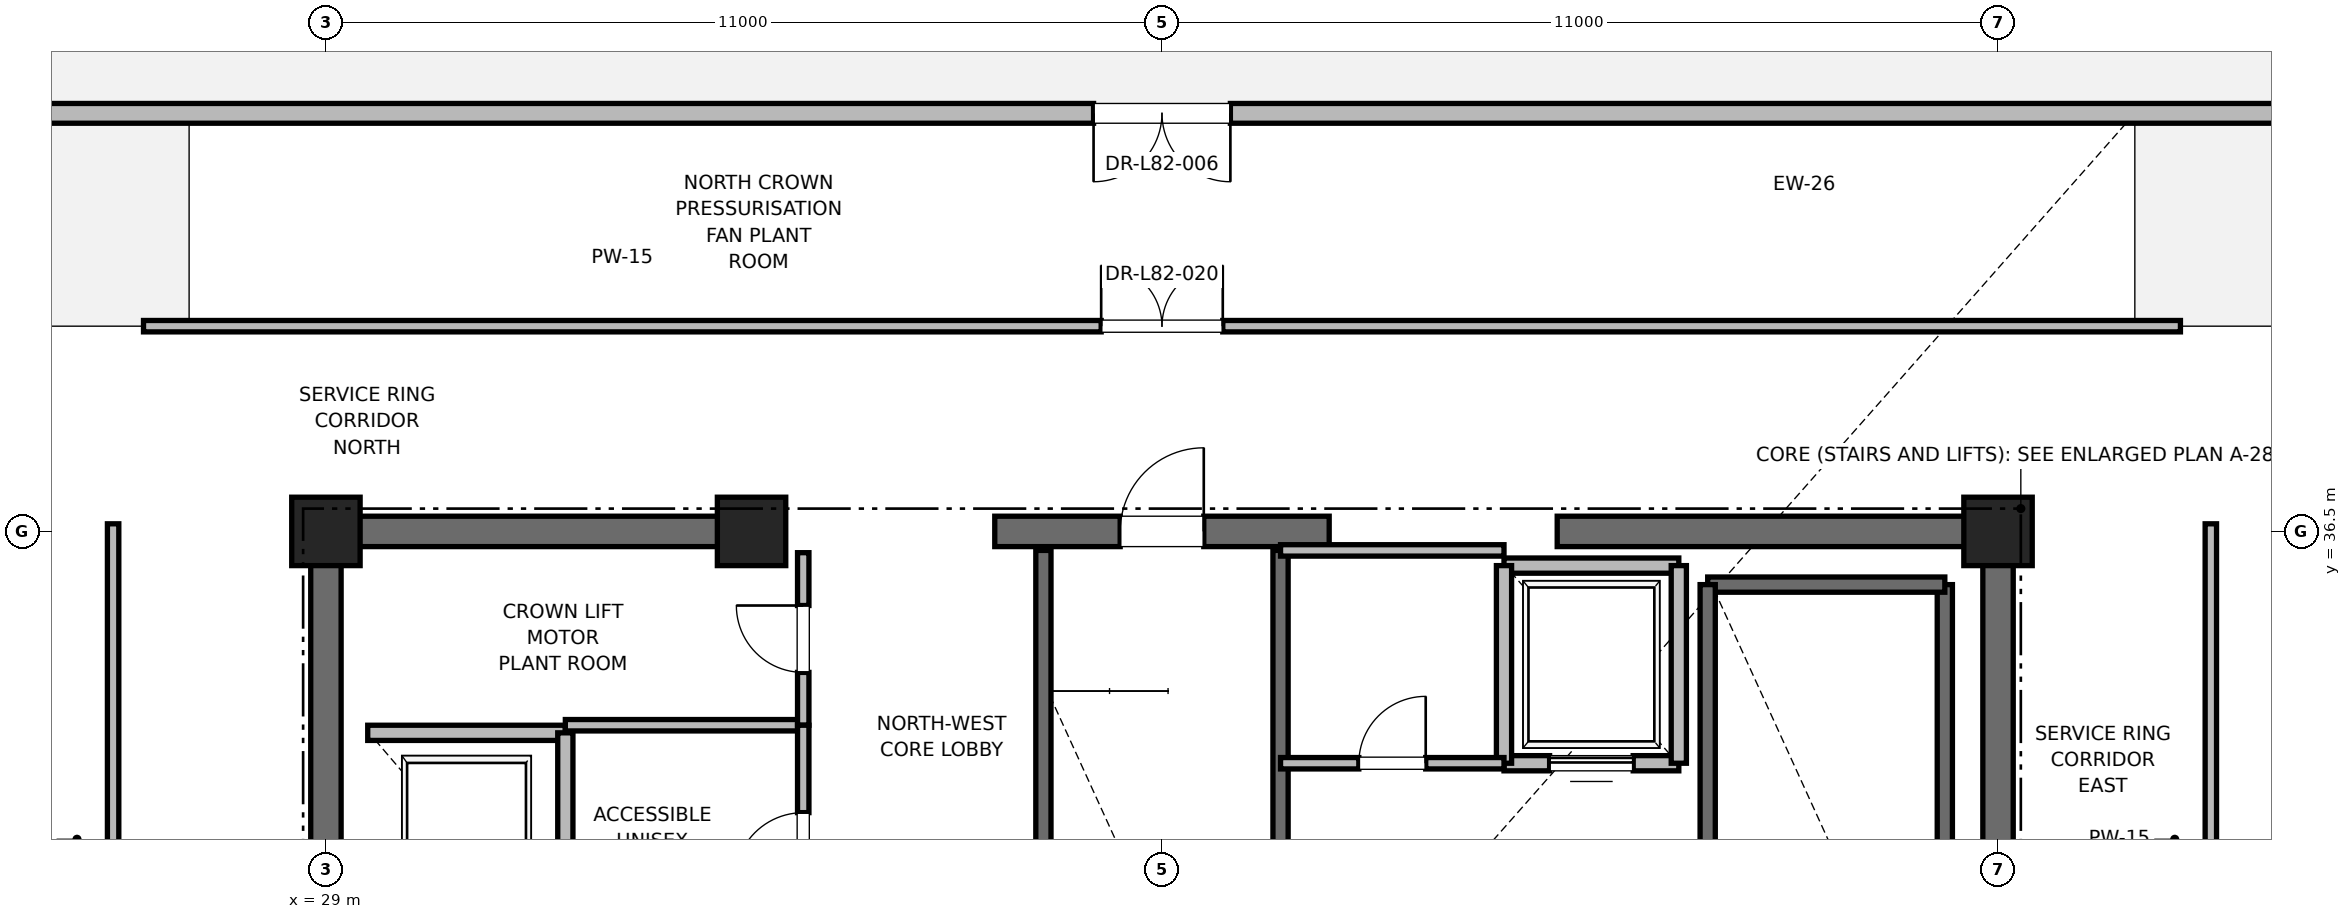
"""IFC4 building model, lengths in metres.
Left out: names, types, materials, properties, quantities, classifications, styles, units other than length and angle.
Written with IfcOpenShell. Run it as: python <this file> out.ifc"""

import sys

from ifc_helpers import new_model, si_unit, direction, frame, frame_2d, origin, origin_2d, place, context, subcontext, project, spatial, rectangle, extrude, element, fill, save


model = new_model("IFC4")
c1 = context("Model", 3, precision=1e-05, world=origin(), true_north=direction((0.0, 1.0)))
c2 = subcontext(c1, "Body", "Model", "MODEL_VIEW")
j1 = project(units=[si_unit("LENGTHUNIT", "METRE"), si_unit("PLANEANGLEUNIT", "RADIAN")], contexts=[c1])
p1 = place(None, origin())
s1 = spatial("IfcSite", under=j1, at=p1, CompositionType="ELEMENT")
p2 = place(p1, origin())
s2 = spatial("IfcBuilding", under=s1, at=p2, CompositionType="ELEMENT")
p3 = place(p2, frame((0.0, 0.0, 354.3)))
s3 = spatial("IfcBuildingStorey", under=s2, at=p3, CompositionType="ELEMENT", Elevation=354.3)
for number, where, z_axis, x_axis in (
    (1, (29.0, 36.5, 0.0), (0.0, 0.0, 1.0), (1.0, 0.0, 0.0)),
    (2, (51.0, 36.5, 0.0), (0.0, 0.0, 1.0), (1.0, 0.0, 0.0)),
    (3, (34.6, 36.5, 0.0), (0.0, 0.0, 1.0), (1.0, 0.0, 0.0)),
):
    element("IfcColumn", number, at=place(p3, frame(where, z_axis=z_axis, x_axis=x_axis)), inside=s3, PredefinedType="PILASTER", context=c2, shape_type="SweptSolid", body=[
        extrude(rectangle(XDim=0.9, YDim=0.9, at=origin_2d()), origin(), (0.0, 0.0, 1.0), 5.5),
    ])
p4 = place(p3, frame((29.0, 36.5, 0.0), z_axis=(0.0, 0.0, 1.0), x_axis=(1.0, 0.0, 0.0)))
e4 = element("IfcWall", 4, at=p4, inside=s3, PredefinedType="SHEAR", context=c2, shape_type="SweptSolid", body=[
    extrude(rectangle(XDim=5.8, YDim=0.4, at=frame_2d((2.9, 0.0))), origin(), (0.0, 0.0, 1.0), 5.24),
])
p5 = place(p3, frame((37.8, 36.5, 0.0), z_axis=(0.0, 0.0, 1.0), x_axis=(1.0, 0.0, 0.0)))
e5 = element("IfcWall", 5, at=p5, inside=s3, PredefinedType="SHEAR", context=c2, shape_type="SweptSolid", body=[
    extrude(rectangle(XDim=4.4, YDim=0.4, at=frame_2d((2.2, 0.0))), origin(), (0.0, 0.0, 1.0), 5.24),
])
p6 = place(p5, frame((1.65, 0.0, 0.0)))
e6 = element("IfcOpeningElement", 6, at=p6, cuts=e5, PredefinedType="OPENING", context=c2, shape_type="SweptSolid", body=[
    extrude(rectangle(XDim=1.1, YDim=2.15, at=frame_2d((0.55, 1.075))), frame((0.0, 0.2, 0.0), z_axis=(0.0, -1.0, 0.0), x_axis=(1.0, 0.0, 0.0)), (0.0, 0.0, 1.0), 0.4),
])
for number, where, z_axis, x_axis in (
    (7, (45.2, 36.5, 0.0), (0.0, 0.0, 1.0), (1.0, 0.0, 0.0)),
    (8, (29.0, 30.7, 0.0), (0.0, 0.0, 1.0), (0.0, 1.0, 0.0)),
):
    element("IfcWall", number, at=place(p3, frame(where, z_axis=z_axis, x_axis=x_axis)), inside=s3, PredefinedType="SHEAR", context=c2, shape_type="SweptSolid", body=[
        extrude(rectangle(XDim=5.8, YDim=0.4, at=frame_2d((2.9, 0.0))), origin(), (0.0, 0.0, 1.0), 5.24),
    ])
p7 = place(p3, frame((51.0, 27.7, 0.0), z_axis=(0.0, 0.0, 1.0), x_axis=(0.0, 1.0, 0.0)))
e9 = element("IfcWall", 9, at=p7, inside=s3, PredefinedType="SHEAR", context=c2, shape_type="SweptSolid", body=[
    extrude(rectangle(XDim=8.8, YDim=0.4, at=frame_2d((4.4, 0.0))), origin(), (0.0, 0.0, 1.0), 5.24),
])
p8 = place(p3, frame((56.0, 42.0, 0.0), z_axis=(0.0, 0.0, 1.0), x_axis=(-1.0, 0.0, 0.0)))
e10 = element("IfcWall", 10, at=p8, inside=s3, PredefinedType="PARAPET", context=c2, shape_type="SweptSolid", body=[
    extrude(rectangle(XDim=32.0, YDim=0.26, at=frame_2d((16.0, 0.0))), origin(), (0.0, 0.0, 1.0), 4.676),
])
p9 = place(p8, frame((15.1, 0.0, 0.0)))
e11 = element("IfcOpeningElement", 11, at=p9, cuts=e10, PredefinedType="OPENING", context=c2, shape_type="SweptSolid", body=[
    extrude(rectangle(XDim=1.8, YDim=2.4, at=frame_2d((0.9, 1.2))), frame((0.0, 0.13, 0.0), z_axis=(0.0, -1.0, 0.0), x_axis=(1.0, 0.0, 0.0)), (0.0, 0.0, 1.0), 0.26),
])
p10 = place(p3, frame((50.3, 27.65, 0.0), z_axis=(0.0, 0.0, 1.0), x_axis=(0.0, 1.0, 0.0)))
e12 = element("IfcWall", 12, at=p10, inside=s3, PredefinedType="SOLIDWALL", context=c2, shape_type="SweptSolid", body=[
    extrude(rectangle(XDim=8.15, YDim=0.2, at=frame_2d((4.075, 0.0))), origin(), (0.0, 0.0, 1.0), 5.24),
])
p11 = place(p3, frame((47.18, 35.8, 0.0), z_axis=(0.0, 0.0, 1.0), x_axis=(1.0, 0.0, 0.0)))
e13 = element("IfcWall", 13, at=p11, inside=s3, PredefinedType="SOLIDWALL", context=c2, shape_type="SweptSolid", body=[
    extrude(rectangle(XDim=3.12, YDim=0.2, at=frame_2d((1.56, 0.0))), origin(), (0.0, 0.0, 1.0), 5.24),
])
p12 = place(p3, frame((47.18, 27.62, 0.0), z_axis=(0.0, 0.0, 1.0), x_axis=(0.0, 1.0, 0.0)))
e14 = element("IfcWall", 14, at=p12, inside=s3, PredefinedType="SOLIDWALL", context=c2, shape_type="SweptSolid", body=[
    extrude(rectangle(XDim=8.18, YDim=0.2, at=frame_2d((4.09, 0.0))), origin(), (0.0, 0.0, 1.0), 5.24),
])
p13 = place(p3, frame((38.44, 27.38, 0.0), z_axis=(0.0, 0.0, 1.0), x_axis=(0.0, 1.0, 0.0)))
e15 = element("IfcWall", 15, at=p13, inside=s3, PredefinedType="SOLIDWALL", context=c2, shape_type="SweptSolid", body=[
    extrude(rectangle(XDim=8.87, YDim=0.2, at=frame_2d((4.435, 0.0))), origin(), (0.0, 0.0, 1.0), 5.24),
])
p14 = place(p3, frame((41.56, 27.68, 0.0), z_axis=(0.0, 0.0, 1.0), x_axis=(0.0, 1.0, 0.0)))
e16 = element("IfcWall", 16, at=p14, inside=s3, PredefinedType="SOLIDWALL", context=c2, shape_type="SweptSolid", body=[
    extrude(rectangle(XDim=8.57, YDim=0.2, at=frame_2d((4.285, 0.0))), origin(), (0.0, 0.0, 1.0), 5.24),
])
p15 = place(p3, frame((32.15, 33.85, 0.0), z_axis=(0.0, 0.0, 1.0), x_axis=(-1.0, 0.0, 0.0)))
e17 = element("IfcWall", 17, at=p15, inside=s3, PredefinedType="SOLIDWALL", context=c2, shape_type="SweptSolid", body=[
    extrude(rectangle(XDim=2.6, YDim=0.2, at=frame_2d((1.3, 0.0))), origin(), (0.0, 0.0, 1.0), 5.24),
])
p16 = place(p3, frame((32.15, 30.85, 0.0), z_axis=(0.0, 0.0, 1.0), x_axis=(0.0, 1.0, 0.0)))
e18 = element("IfcWall", 18, at=p16, inside=s3, PredefinedType="SOLIDWALL", context=c2, shape_type="SweptSolid", body=[
    extrude(rectangle(XDim=3.0, YDim=0.2, at=frame_2d((1.5, 0.0))), origin(), (0.0, 0.0, 1.0), 5.24),
])
p17 = place(p3, frame((44.5, 33.45, 0.0), z_axis=(0.0, 0.0, 1.0), x_axis=(1.0, 0.0, 0.0)))
e19 = element("IfcWall", 19, at=p17, inside=s3, PredefinedType="SOLIDWALL", context=c2, shape_type="SweptSolid", body=[
    extrude(rectangle(XDim=2.3, YDim=0.2, at=frame_2d((1.15, 0.0))), origin(), (0.0, 0.0, 1.0), 5.24),
])
p18 = place(p17, frame((0.6, 0.0, 0.0)))
e20 = element("IfcOpeningElement", 20, at=p18, cuts=e19, PredefinedType="OPENING", context=c2, shape_type="SweptSolid", body=[
    extrude(rectangle(XDim=1.1, YDim=2.2, at=frame_2d((0.55, 1.1))), frame((0.0, 0.1, 0.0), z_axis=(0.0, -1.0, 0.0), x_axis=(1.0, 0.0, 0.0)), (0.0, 0.0, 1.0), 0.2),
])
p19 = place(p3, frame((46.8, 36.05, 0.0), z_axis=(0.0, 0.0, 1.0), x_axis=(-1.0, 0.0, 0.0)))
e21 = element("IfcWall", 21, at=p19, inside=s3, PredefinedType="SOLIDWALL", context=c2, shape_type="SweptSolid", body=[
    extrude(rectangle(XDim=2.3, YDim=0.2, at=frame_2d((1.15, 0.0))), origin(), (0.0, 0.0, 1.0), 4.32),
])
p20 = place(p3, frame((44.5, 36.05, 0.0), z_axis=(0.0, 0.0, 1.0), x_axis=(0.0, -1.0, 0.0)))
e22 = element("IfcWall", 22, at=p20, inside=s3, PredefinedType="SOLIDWALL", context=c2, shape_type="SweptSolid", body=[
    extrude(rectangle(XDim=2.6, YDim=0.2, at=frame_2d((1.3, 0.0))), origin(), (0.0, 0.0, 1.0), 4.32),
])
p21 = place(p3, frame((46.8, 33.45, 0.0), z_axis=(0.0, 0.0, 1.0), x_axis=(0.0, 1.0, 0.0)))
e23 = element("IfcWall", 23, at=p21, inside=s3, PredefinedType="SOLIDWALL", context=c2, shape_type="SweptSolid", body=[
    extrude(rectangle(XDim=2.6, YDim=0.2, at=frame_2d((1.3, 0.0))), origin(), (0.0, 0.0, 1.0), 5.24),
])
p22 = place(p3, frame((32.15, 33.95, 0.0), z_axis=(0.0, 0.0, 1.0), x_axis=(1.0, 0.0, 0.0)))
e24 = element("IfcWall", 24, at=p22, inside=s3, PredefinedType="PARTITIONING", context=c2, shape_type="SweptSolid", body=[
    extrude(rectangle(XDim=3.13, YDim=0.15, at=frame_2d((1.565, 0.0))), origin(), (0.0, 0.0, 1.0), 2.85),
])
p23 = place(p3, frame((35.28, 33.95, 0.0), z_axis=(0.0, 0.0, 1.0), x_axis=(0.0, 1.0, 0.0)))
e25 = element("IfcWall", 25, at=p23, inside=s3, PredefinedType="PARTITIONING", context=c2, shape_type="SweptSolid", body=[
    extrude(rectangle(XDim=2.27, YDim=0.15, at=frame_2d((1.135, 0.0))), origin(), (0.0, 0.0, 1.0), 2.85),
])
p24 = place(p23, frame((0.695, 0.0, 0.0)))
e26 = element("IfcOpeningElement", 26, at=p24, cuts=e25, PredefinedType="OPENING", context=c2, shape_type="SweptSolid", body=[
    extrude(rectangle(XDim=0.88, YDim=2.1, at=frame_2d((0.44, 1.05))), frame((0.0, 0.075, 0.0), z_axis=(0.0, -1.0, 0.0), x_axis=(1.0, 0.0, 0.0)), (0.0, 0.0, 1.0), 0.15),
])
p25 = place(p3, frame((35.28, 30.75, 0.0), z_axis=(0.0, 0.0, 1.0), x_axis=(0.0, 1.0, 0.0)))
e27 = element("IfcWall", 27, at=p25, inside=s3, PredefinedType="PARTITIONING", context=c2, shape_type="SweptSolid", body=[
    extrude(rectangle(XDim=3.2, YDim=0.15, at=frame_2d((1.6, 0.0))), origin(), (0.0, 0.0, 1.0), 2.85),
])
p26 = place(p25, frame((1.15, 0.0, 0.0)))
e28 = element("IfcOpeningElement", 28, at=p26, cuts=e27, PredefinedType="OPENING", context=c2, shape_type="SweptSolid", body=[
    extrude(rectangle(XDim=0.9, YDim=2.1, at=frame_2d((0.45, 1.05))), frame((0.0, 0.075, 0.0), z_axis=(0.0, -1.0, 0.0), x_axis=(1.0, 0.0, 0.0)), (0.0, 0.0, 1.0), 0.15),
])
p27 = place(p3, frame((41.56, 36.25, 0.0), z_axis=(0.0, 0.0, 1.0), x_axis=(1.0, 0.0, 0.0)))
e29 = element("IfcWall", 29, at=p27, inside=s3, PredefinedType="PARTITIONING", context=c2, shape_type="SweptSolid", body=[
    extrude(rectangle(XDim=2.94, YDim=0.15, at=frame_2d((1.47, 0.0))), origin(), (0.0, 0.0, 1.0), 2.85),
])
p28 = place(p3, frame((41.56, 33.45, 0.0), z_axis=(0.0, 0.0, 1.0), x_axis=(1.0, 0.0, 0.0)))
e30 = element("IfcWall", 30, at=p28, inside=s3, PredefinedType="PARTITIONING", context=c2, shape_type="SweptSolid", body=[
    extrude(rectangle(XDim=2.94, YDim=0.15, at=frame_2d((1.47, 0.0))), origin(), (0.0, 0.0, 1.0), 2.85),
])
p29 = place(p28, frame((1.03, 0.0, 0.0)))
e31 = element("IfcOpeningElement", 31, at=p29, cuts=e30, PredefinedType="OPENING", context=c2, shape_type="SweptSolid", body=[
    extrude(rectangle(XDim=0.88, YDim=2.1, at=frame_2d((0.44, 1.05))), frame((0.0, 0.075, 0.0), z_axis=(0.0, -1.0, 0.0), x_axis=(1.0, 0.0, 0.0)), (0.0, 0.0, 1.0), 0.15),
])
p30 = place(p3, frame((26.2, 18.4, 0.0), z_axis=(0.0, 0.0, 1.0), x_axis=(0.0, 1.0, 0.0)))
e32 = element("IfcWall", 32, at=p30, inside=s3, PredefinedType="PARTITIONING", context=c2, shape_type="SweptSolid", body=[
    extrude(rectangle(XDim=18.2, YDim=0.15, at=frame_2d((9.1, 0.0))), origin(), (0.0, 0.0, 1.0), 2.85),
])
p31 = place(p30, frame((8.3, 0.0, 0.0)))
e33 = element("IfcOpeningElement", 33, at=p31, cuts=e32, PredefinedType="OPENING", context=c2, shape_type="SweptSolid", body=[
    extrude(rectangle(XDim=1.6, YDim=2.25, at=frame_2d((0.8, 1.125))), frame((0.0, 0.075, 0.0), z_axis=(0.0, -1.0, 0.0), x_axis=(1.0, 0.0, 0.0)), (0.0, 0.0, 1.0), 0.15),
])
p32 = place(p3, frame((53.8, 18.4, 0.0), z_axis=(0.0, 0.0, 1.0), x_axis=(0.0, 1.0, 0.0)))
e34 = element("IfcWall", 34, at=p32, inside=s3, PredefinedType="PARTITIONING", context=c2, shape_type="SweptSolid", body=[
    extrude(rectangle(XDim=18.2, YDim=0.15, at=frame_2d((9.1, 0.0))), origin(), (0.0, 0.0, 1.0), 2.85),
])
p33 = place(p32, frame((8.3, 0.0, 0.0)))
e35 = element("IfcOpeningElement", 35, at=p33, cuts=e34, PredefinedType="OPENING", context=c2, shape_type="SweptSolid", body=[
    extrude(rectangle(XDim=1.6, YDim=2.25, at=frame_2d((0.8, 1.125))), frame((0.0, 0.075, 0.0), z_axis=(0.0, -1.0, 0.0), x_axis=(1.0, 0.0, 0.0)), (0.0, 0.0, 1.0), 0.15),
])
p34 = place(p3, frame((26.6, 39.2, 0.0), z_axis=(0.0, 0.0, 1.0), x_axis=(1.0, 0.0, 0.0)))
e36 = element("IfcWall", 36, at=p34, inside=s3, PredefinedType="PARTITIONING", context=c2, shape_type="SweptSolid", body=[
    extrude(rectangle(XDim=26.8, YDim=0.15, at=frame_2d((13.4, 0.0))), origin(), (0.0, 0.0, 1.0), 2.85),
])
p35 = place(p34, frame((12.6, 0.0, 0.0)))
e37 = element("IfcOpeningElement", 37, at=p35, cuts=e36, PredefinedType="OPENING", context=c2, shape_type="SweptSolid", body=[
    extrude(rectangle(XDim=1.6, YDim=2.25, at=frame_2d((0.8, 1.125))), frame((0.0, 0.075, 0.0), z_axis=(0.0, -1.0, 0.0), x_axis=(1.0, 0.0, 0.0)), (0.0, 0.0, 1.0), 0.15),
])
p36 = place(p9, origin())
e38 = element("IfcDoor", 38, at=p36, inside=s3, OperationType="DOUBLE_DOOR_SINGLE_SWING", PredefinedType="DOOR", context=c2, shape_type="SweptSolid", body=[
    extrude(rectangle(XDim=1.8, YDim=2.4, at=frame_2d((0.9, 1.2))), frame((0.0, 0.025, 0.0), z_axis=(0.0, -1.0, 0.0), x_axis=(1.0, 0.0, 0.0)), (0.0, 0.0, 1.0), 0.05),
])
fill(e11, e38)
p37 = place(p6, origin())
e39 = element("IfcDoor", 39, at=p37, inside=s3, OperationType="SINGLE_SWING_RIGHT", PredefinedType="DOOR", context=c2, shape_type="SweptSolid", body=[
    extrude(rectangle(XDim=1.1, YDim=2.15, at=frame_2d((0.55, 1.075))), frame((0.0, 0.025, 0.0), z_axis=(0.0, -1.0, 0.0), x_axis=(1.0, 0.0, 0.0)), (0.0, 0.0, 1.0), 0.05),
])
fill(e6, e39)
p38 = place(p18, origin())
e40 = element("IfcDoor", 40, at=p38, inside=s3, OperationType="SLIDING_TO_RIGHT", PredefinedType="DOOR", context=c2, shape_type="SweptSolid", body=[
    extrude(rectangle(XDim=1.1, YDim=2.2, at=frame_2d((0.55, 1.1))), frame((0.0, 0.025, 0.0), z_axis=(0.0, -1.0, 0.0), x_axis=(1.0, 0.0, 0.0)), (0.0, 0.0, 1.0), 0.05),
])
fill(e20, e40)
p39 = place(p24, origin())
e41 = element("IfcDoor", 41, at=p39, inside=s3, OperationType="SINGLE_SWING_RIGHT", PredefinedType="DOOR", context=c2, shape_type="SweptSolid", body=[
    extrude(rectangle(XDim=0.88, YDim=2.1, at=frame_2d((0.44, 1.05))), frame((0.0, 0.025, 0.0), z_axis=(0.0, -1.0, 0.0), x_axis=(1.0, 0.0, 0.0)), (0.0, 0.0, 1.0), 0.05),
])
fill(e26, e41)
p40 = place(p26, origin())
e42 = element("IfcDoor", 42, at=p40, inside=s3, OperationType="SINGLE_SWING_LEFT", PredefinedType="DOOR", context=c2, shape_type="SweptSolid", body=[
    extrude(rectangle(XDim=0.9, YDim=2.1, at=frame_2d((0.45, 1.05))), frame((0.0, 0.025, 0.0), z_axis=(0.0, -1.0, 0.0), x_axis=(1.0, 0.0, 0.0)), (0.0, 0.0, 1.0), 0.05),
])
fill(e28, e42)
p41 = place(p29, origin())
e43 = element("IfcDoor", 43, at=p41, inside=s3, OperationType="SINGLE_SWING_RIGHT", PredefinedType="DOOR", context=c2, shape_type="SweptSolid", body=[
    extrude(rectangle(XDim=0.88, YDim=2.1, at=frame_2d((0.44, 1.05))), frame((0.0, 0.025, 0.0), z_axis=(0.0, -1.0, 0.0), x_axis=(1.0, 0.0, 0.0)), (0.0, 0.0, 1.0), 0.05),
])
fill(e31, e43)
p42 = place(p35, origin())
e44 = element("IfcDoor", 44, at=p42, inside=s3, OperationType="DOUBLE_DOOR_SINGLE_SWING", PredefinedType="DOOR", context=c2, shape_type="SweptSolid", body=[
    extrude(rectangle(XDim=1.6, YDim=2.25, at=frame_2d((0.8, 1.125))), frame((0.0, 0.025, 0.0), z_axis=(0.0, -1.0, 0.0), x_axis=(1.0, 0.0, 0.0)), (0.0, 0.0, 1.0), 0.05),
])
fill(e37, e44)
save(model, sys.argv[1])
